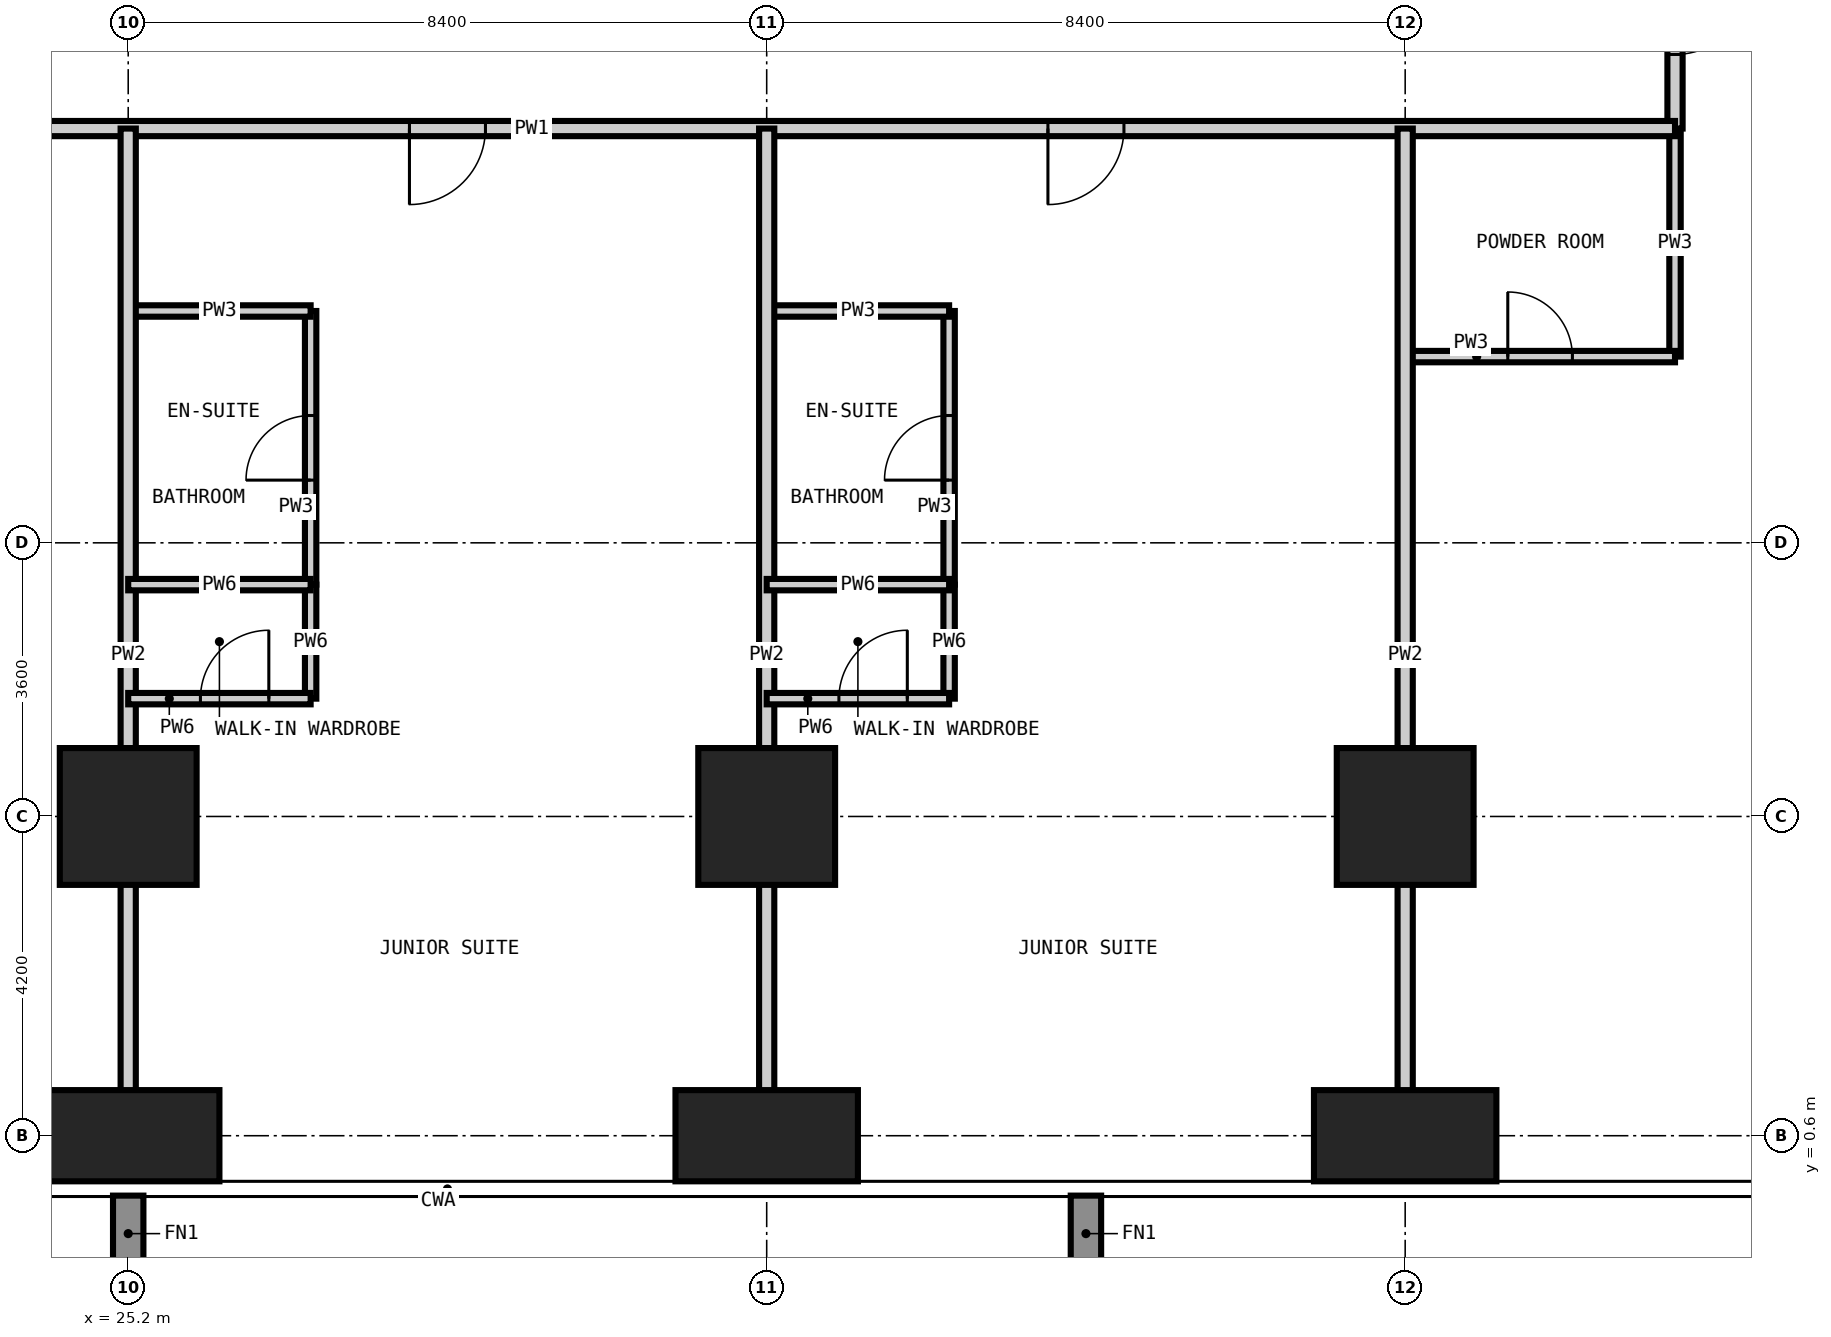
"""IFC4 building model, lengths in metres.
Left out: names, types, materials, properties, quantities, classifications, styles, units other than length and angle.
Written with IfcOpenShell. Run it as: python <this file> out.ifc"""

import sys

from ifc_helpers import new_model, si_unit, direction, frame, frame_2d, origin, origin_2d, place, context, subcontext, project, spatial, rectangle, extrude, element, fill, save


model = new_model("IFC4")
c1 = context("Model", 3, precision=1e-05, world=origin(), true_north=direction((0.0, 1.0)))
c2 = subcontext(c1, "Body", "Model", "MODEL_VIEW")
j1 = project(units=[si_unit("LENGTHUNIT", "METRE"), si_unit("PLANEANGLEUNIT", "RADIAN")], contexts=[c1])
p1 = place(None, origin())
s1 = spatial("IfcSite", under=j1, at=p1, CompositionType="ELEMENT")
p2 = place(p1, origin())
s2 = spatial("IfcBuilding", under=s1, at=p2, CompositionType="ELEMENT")
p3 = place(p2, frame((0.0, 0.0, 55.8)))
s3 = spatial("IfcBuildingStorey", under=s2, at=p3, CompositionType="ELEMENT", Elevation=55.8)
p4 = place(p3, frame((25.2, 0.6, -0.35), z_axis=(0.0, 0.0, 1.0), x_axis=(1.0, 0.0, 0.0)))
e1 = element("IfcColumn", 1, at=p4, inside=s3, PredefinedType="COLUMN", context=c2, shape_type="SweptSolid", body=[
    extrude(rectangle(XDim=2.4, YDim=1.2, at=origin_2d()), origin(), (0.0, 0.0, 1.0), 3.6),
])
p5 = place(p3, frame((25.2, 4.8, -0.35), z_axis=(0.0, 0.0, 1.0), x_axis=(1.0, 0.0, 0.0)))
e2 = element("IfcColumn", 2, at=p5, inside=s3, PredefinedType="COLUMN", context=c2, shape_type="SweptSolid", body=[
    extrude(rectangle(XDim=1.8, YDim=1.8, at=origin_2d()), origin(), (0.0, 0.0, 1.0), 3.6),
])
p6 = place(p3, frame((33.6, 0.6, -0.35), z_axis=(0.0, 0.0, 1.0), x_axis=(1.0, 0.0, 0.0)))
e3 = element("IfcColumn", 3, at=p6, inside=s3, PredefinedType="COLUMN", context=c2, shape_type="SweptSolid", body=[
    extrude(rectangle(XDim=2.4, YDim=1.2, at=origin_2d()), origin(), (0.0, 0.0, 1.0), 3.6),
])
p7 = place(p3, frame((33.6, 4.8, -0.35), z_axis=(0.0, 0.0, 1.0), x_axis=(1.0, 0.0, 0.0)))
e4 = element("IfcColumn", 4, at=p7, inside=s3, PredefinedType="COLUMN", context=c2, shape_type="SweptSolid", body=[
    extrude(rectangle(XDim=1.8, YDim=1.8, at=origin_2d()), origin(), (0.0, 0.0, 1.0), 3.6),
])
p8 = place(p3, frame((42.0, 0.6, -0.35), z_axis=(0.0, 0.0, 1.0), x_axis=(1.0, 0.0, 0.0)))
e5 = element("IfcColumn", 5, at=p8, inside=s3, PredefinedType="COLUMN", context=c2, shape_type="SweptSolid", body=[
    extrude(rectangle(XDim=2.4, YDim=1.2, at=origin_2d()), origin(), (0.0, 0.0, 1.0), 3.6),
])
p9 = place(p3, frame((42.0, 4.8, -0.35), z_axis=(0.0, 0.0, 1.0), x_axis=(1.0, 0.0, 0.0)))
e6 = element("IfcColumn", 6, at=p9, inside=s3, PredefinedType="COLUMN", context=c2, shape_type="SweptSolid", body=[
    extrude(rectangle(XDim=1.8, YDim=1.8, at=origin_2d()), origin(), (0.0, 0.0, 1.0), 3.6),
])
p10 = place(p3, frame((27.6, 7.85, 0.0), z_axis=(0.0, 0.0, 1.0), x_axis=(0.0, 1.0, 0.0)))
e7 = element("IfcWall", 7, at=p10, inside=s3, PredefinedType="PARTITIONING", context=c2, shape_type="SweptSolid", body=[
    extrude(rectangle(XDim=3.6, YDim=0.15, at=frame_2d((1.8, 0.0))), origin(), (0.0, 0.0, 1.0), 3.25),
])
p11 = place(p10, frame((1.375, 0.0, 0.0)))
e8 = element("IfcOpeningElement", 8, at=p11, cuts=e7, PredefinedType="OPENING", context=c2, shape_type="SweptSolid", body=[
    extrude(rectangle(XDim=0.85, YDim=2.1, at=frame_2d((0.425, 1.05))), frame((0.0, 0.085, 0.0), z_axis=(0.0, -1.0, 0.0), x_axis=(1.0, 0.0, 0.0)), (0.0, 0.0, 1.0), 0.17),
])
p12 = place(p3, frame((36.0, 7.85, 0.0), z_axis=(0.0, 0.0, 1.0), x_axis=(0.0, 1.0, 0.0)))
e9 = element("IfcWall", 9, at=p12, inside=s3, PredefinedType="PARTITIONING", context=c2, shape_type="SweptSolid", body=[
    extrude(rectangle(XDim=3.6, YDim=0.15, at=frame_2d((1.8, 0.0))), origin(), (0.0, 0.0, 1.0), 3.25),
])
p13 = place(p12, frame((1.375, 0.0, 0.0)))
e10 = element("IfcOpeningElement", 10, at=p13, cuts=e9, PredefinedType="OPENING", context=c2, shape_type="SweptSolid", body=[
    extrude(rectangle(XDim=0.85, YDim=2.1, at=frame_2d((0.425, 1.05))), frame((0.0, 0.085, 0.0), z_axis=(0.0, -1.0, 0.0), x_axis=(1.0, 0.0, 0.0)), (0.0, 0.0, 1.0), 0.17),
])
p14 = place(p3, frame((45.55, 10.85, 0.0), z_axis=(0.0, 0.0, 1.0), x_axis=(0.0, 1.0, 0.0)))
e11 = element("IfcWall", 11, at=p14, inside=s3, PredefinedType="PARTITIONING", context=c2, shape_type="SweptSolid", body=[
    extrude(rectangle(XDim=3.0, YDim=0.15, at=frame_2d((1.5, 0.0))), origin(), (0.0, 0.0, 1.0), 3.25),
])
p15 = place(p3, frame((42.0, 10.85, 0.0), z_axis=(0.0, 0.0, 1.0), x_axis=(1.0, 0.0, 0.0)))
e12 = element("IfcWall", 12, at=p15, inside=s3, PredefinedType="PARTITIONING", context=c2, shape_type="SweptSolid", body=[
    extrude(rectangle(XDim=3.55, YDim=0.15, at=frame_2d((1.775, 0.0))), origin(), (0.0, 0.0, 1.0), 3.25),
])
p16 = place(p15, frame((1.35, 0.0, 0.0)))
e13 = element("IfcOpeningElement", 13, at=p16, cuts=e12, PredefinedType="OPENING", context=c2, shape_type="SweptSolid", body=[
    extrude(rectangle(XDim=0.85, YDim=2.1, at=frame_2d((0.425, 1.05))), frame((0.0, 0.085, 0.0), z_axis=(0.0, -1.0, 0.0), x_axis=(1.0, 0.0, 0.0)), (0.0, 0.0, 1.0), 0.17),
])
p17 = place(p3, frame((25.2, 11.45, 0.0), z_axis=(0.0, 0.0, 1.0), x_axis=(1.0, 0.0, 0.0)))
e14 = element("IfcWall", 14, at=p17, inside=s3, PredefinedType="PARTITIONING", context=c2, shape_type="SweptSolid", body=[
    extrude(rectangle(XDim=2.4, YDim=0.15, at=frame_2d((1.2, 0.0))), origin(), (0.0, 0.0, 1.0), 3.25),
])
p18 = place(p3, frame((33.6, 11.45, 0.0), z_axis=(0.0, 0.0, 1.0), x_axis=(1.0, 0.0, 0.0)))
e15 = element("IfcWall", 15, at=p18, inside=s3, PredefinedType="PARTITIONING", context=c2, shape_type="SweptSolid", body=[
    extrude(rectangle(XDim=2.4, YDim=0.15, at=frame_2d((1.2, 0.0))), origin(), (0.0, 0.0, 1.0), 3.25),
])
p19 = place(p3, frame((45.55, 46.15, 0.0), z_axis=(0.0, 0.0, 1.0), x_axis=(0.0, -1.0, 0.0)))
e16 = element("IfcWall", 16, at=p19, inside=s3, PredefinedType="PARTITIONING", context=c2, shape_type="SweptSolid", body=[
    extrude(rectangle(XDim=32.3, YDim=0.2, at=frame_2d((16.15, 0.0))), origin(), (0.0, 0.0, 1.0), 3.25),
])
p20 = place(p19, frame((25.85, 0.0, 0.0)))
e17 = element("IfcOpeningElement", 17, at=p20, cuts=e16, PredefinedType="OPENING", context=c2, shape_type="SweptSolid", body=[
    extrude(rectangle(XDim=1.0, YDim=2.2, at=frame_2d((0.5, 1.1))), frame((0.0, 0.11, 0.0), z_axis=(0.0, -1.0, 0.0), x_axis=(1.0, 0.0, 0.0)), (0.0, 0.0, 1.0), 0.22),
])
p21 = place(p19, frame((17.45, 0.0, 0.0)))
e18 = element("IfcOpeningElement", 18, at=p21, cuts=e16, PredefinedType="OPENING", context=c2, shape_type="SweptSolid", body=[
    extrude(rectangle(XDim=1.0, YDim=2.2, at=frame_2d((0.5, 1.1))), frame((0.0, 0.11, 0.0), z_axis=(0.0, -1.0, 0.0), x_axis=(1.0, 0.0, 0.0)), (0.0, 0.0, 1.0), 0.22),
])
p22 = place(p19, frame((9.05, 0.0, 0.0)))
e19 = element("IfcOpeningElement", 19, at=p22, cuts=e16, PredefinedType="OPENING", context=c2, shape_type="SweptSolid", body=[
    extrude(rectangle(XDim=1.0, YDim=2.2, at=frame_2d((0.5, 1.1))), frame((0.0, 0.11, 0.0), z_axis=(0.0, -1.0, 0.0), x_axis=(1.0, 0.0, 0.0)), (0.0, 0.0, 1.0), 0.22),
])
p23 = place(p19, frame((30.325, 0.0, 0.0)))
e20 = element("IfcOpeningElement", 20, at=p23, cuts=e16, PredefinedType="OPENING", context=c2, shape_type="SweptSolid", body=[
    extrude(rectangle(XDim=1.0, YDim=2.2, at=frame_2d((0.5, 1.1))), frame((0.0, 0.11, 0.0), z_axis=(0.0, -1.0, 0.0), x_axis=(1.0, 0.0, 0.0)), (0.0, 0.0, 1.0), 0.22),
])
p24 = place(p19, frame((1.575, 0.0, 0.0)))
e21 = element("IfcOpeningElement", 21, at=p24, cuts=e16, PredefinedType="OPENING", context=c2, shape_type="SweptSolid", body=[
    extrude(rectangle(XDim=1.0, YDim=2.2, at=frame_2d((0.5, 1.1))), frame((0.0, 0.11, 0.0), z_axis=(0.0, -1.0, 0.0), x_axis=(1.0, 0.0, 0.0)), (0.0, 0.0, 1.0), 0.22),
])
p25 = place(p3, frame((45.55, 13.85, 0.0), z_axis=(0.0, 0.0, 1.0), x_axis=(-1.0, 0.0, 0.0)))
e22 = element("IfcWall", 22, at=p25, inside=s3, PredefinedType="PARTITIONING", context=c2, shape_type="SweptSolid", body=[
    extrude(rectangle(XDim=31.7, YDim=0.2, at=frame_2d((15.85, 0.0))), origin(), (0.0, 0.0, 1.0), 3.25),
])
p26 = place(p25, frame((24.05, 0.0, 0.0)))
e23 = element("IfcOpeningElement", 23, at=p26, cuts=e22, PredefinedType="OPENING", context=c2, shape_type="SweptSolid", body=[
    extrude(rectangle(XDim=1.0, YDim=2.2, at=frame_2d((0.5, 1.1))), frame((0.0, 0.11, 0.0), z_axis=(0.0, -1.0, 0.0), x_axis=(1.0, 0.0, 0.0)), (0.0, 0.0, 1.0), 0.22),
])
p27 = place(p25, frame((15.65, 0.0, 0.0)))
e24 = element("IfcOpeningElement", 24, at=p27, cuts=e22, PredefinedType="OPENING", context=c2, shape_type="SweptSolid", body=[
    extrude(rectangle(XDim=1.0, YDim=2.2, at=frame_2d((0.5, 1.1))), frame((0.0, 0.11, 0.0), z_axis=(0.0, -1.0, 0.0), x_axis=(1.0, 0.0, 0.0)), (0.0, 0.0, 1.0), 0.22),
])
p28 = place(p25, frame((7.25, 0.0, 0.0)))
e25 = element("IfcOpeningElement", 25, at=p28, cuts=e22, PredefinedType="OPENING", context=c2, shape_type="SweptSolid", body=[
    extrude(rectangle(XDim=1.0, YDim=2.2, at=frame_2d((0.5, 1.1))), frame((0.0, 0.11, 0.0), z_axis=(0.0, -1.0, 0.0), x_axis=(1.0, 0.0, 0.0)), (0.0, 0.0, 1.0), 0.22),
])
for number, where, z_axis, x_axis in (
    (26, (25.2, -0.008, 0.0), (0.0, 0.0, 1.0), (0.0, 1.0, 0.0)),
    (27, (33.6, -0.008, 0.0), (0.0, 0.0, 1.0), (0.0, 1.0, 0.0)),
    (28, (42.0, -0.008, 0.0), (0.0, 0.0, 1.0), (0.0, 1.0, 0.0)),
):
    element("IfcWall", number, at=place(p3, frame(where, z_axis=z_axis, x_axis=x_axis)), inside=s3, PredefinedType="PARTITIONING", context=c2, shape_type="SweptSolid", body=[
        extrude(rectangle(XDim=13.858, YDim=0.2, at=frame_2d((6.929, 0.0))), origin(), (0.0, 0.0, 1.0), 3.25),
    ])
for number, where, z_axis, x_axis in (
    (29, (27.6, 6.35, 0.0), (0.0, 0.0, 1.0), (0.0, 1.0, 0.0)),
    (30, (36.0, 6.35, 0.0), (0.0, 0.0, 1.0), (0.0, 1.0, 0.0)),
):
    element("IfcWall", number, at=place(p3, frame(where, z_axis=z_axis, x_axis=x_axis)), inside=s3, PredefinedType="PARTITIONING", context=c2, shape_type="SweptSolid", body=[
        extrude(rectangle(XDim=1.5, YDim=0.15, at=frame_2d((0.75, 0.0))), origin(), (0.0, 0.0, 1.0), 3.25),
    ])
p29 = place(p3, frame((25.2, 6.35, 0.0), z_axis=(0.0, 0.0, 1.0), x_axis=(1.0, 0.0, 0.0)))
e31 = element("IfcWall", 31, at=p29, inside=s3, PredefinedType="PARTITIONING", context=c2, shape_type="SweptSolid", body=[
    extrude(rectangle(XDim=2.4, YDim=0.15, at=frame_2d((1.2, 0.0))), origin(), (0.0, 0.0, 1.0), 3.25),
])
p30 = place(p29, frame((0.95, 0.0, 0.0)))
e32 = element("IfcOpeningElement", 32, at=p30, cuts=e31, PredefinedType="OPENING", context=c2, shape_type="SweptSolid", body=[
    extrude(rectangle(XDim=0.9, YDim=2.1, at=frame_2d((0.45, 1.05))), frame((0.0, 0.085, 0.0), z_axis=(0.0, -1.0, 0.0), x_axis=(1.0, 0.0, 0.0)), (0.0, 0.0, 1.0), 0.17),
])
p31 = place(p3, frame((33.6, 6.35, 0.0), z_axis=(0.0, 0.0, 1.0), x_axis=(1.0, 0.0, 0.0)))
e33 = element("IfcWall", 33, at=p31, inside=s3, PredefinedType="PARTITIONING", context=c2, shape_type="SweptSolid", body=[
    extrude(rectangle(XDim=2.4, YDim=0.15, at=frame_2d((1.2, 0.0))), origin(), (0.0, 0.0, 1.0), 3.25),
])
p32 = place(p31, frame((0.95, 0.0, 0.0)))
e34 = element("IfcOpeningElement", 34, at=p32, cuts=e33, PredefinedType="OPENING", context=c2, shape_type="SweptSolid", body=[
    extrude(rectangle(XDim=0.9, YDim=2.1, at=frame_2d((0.45, 1.05))), frame((0.0, 0.085, 0.0), z_axis=(0.0, -1.0, 0.0), x_axis=(1.0, 0.0, 0.0)), (0.0, 0.0, 1.0), 0.17),
])
p33 = place(p3, frame((25.2, 7.85, 0.0), z_axis=(0.0, 0.0, 1.0), x_axis=(1.0, 0.0, 0.0)))
e35 = element("IfcWall", 35, at=p33, inside=s3, PredefinedType="PARTITIONING", context=c2, shape_type="SweptSolid", body=[
    extrude(rectangle(XDim=2.4, YDim=0.15, at=frame_2d((1.2, 0.0))), origin(), (0.0, 0.0, 1.0), 3.25),
])
p34 = place(p3, frame((33.6, 7.85, 0.0), z_axis=(0.0, 0.0, 1.0), x_axis=(1.0, 0.0, 0.0)))
e36 = element("IfcWall", 36, at=p34, inside=s3, PredefinedType="PARTITIONING", context=c2, shape_type="SweptSolid", body=[
    extrude(rectangle(XDim=2.4, YDim=0.15, at=frame_2d((1.2, 0.0))), origin(), (0.0, 0.0, 1.0), 3.25),
])
p35 = place(p27, origin())
e37 = element("IfcDoor", 37, at=p35, inside=s3, OperationType="SINGLE_SWING_RIGHT", PredefinedType="DOOR", context=c2, shape_type="SweptSolid", body=[
    extrude(rectangle(XDim=1.0, YDim=2.2, at=frame_2d((0.5, 1.1))), frame((0.0, 0.025, 0.0), z_axis=(0.0, -1.0, 0.0), x_axis=(1.0, 0.0, 0.0)), (0.0, 0.0, 1.0), 0.05),
])
fill(e24, e37)
p36 = place(p11, origin())
e38 = element("IfcDoor", 38, at=p36, inside=s3, OperationType="SINGLE_SWING_LEFT", PredefinedType="DOOR", context=c2, shape_type="SweptSolid", body=[
    extrude(rectangle(XDim=0.85, YDim=2.1, at=frame_2d((0.425, 1.05))), frame((0.0, 0.025, 0.0), z_axis=(0.0, -1.0, 0.0), x_axis=(1.0, 0.0, 0.0)), (0.0, 0.0, 1.0), 0.05),
])
fill(e8, e38)
p37 = place(p30, origin())
e39 = element("IfcDoor", 39, at=p37, inside=s3, OperationType="SINGLE_SWING_RIGHT", PredefinedType="DOOR", context=c2, shape_type="SweptSolid", body=[
    extrude(rectangle(XDim=0.9, YDim=2.1, at=frame_2d((0.45, 1.05))), frame((0.0, 0.025, 0.0), z_axis=(0.0, -1.0, 0.0), x_axis=(1.0, 0.0, 0.0)), (0.0, 0.0, 1.0), 0.05),
])
fill(e32, e39)
p38 = place(p28, origin())
e40 = element("IfcDoor", 40, at=p38, inside=s3, OperationType="SINGLE_SWING_RIGHT", PredefinedType="DOOR", context=c2, shape_type="SweptSolid", body=[
    extrude(rectangle(XDim=1.0, YDim=2.2, at=frame_2d((0.5, 1.1))), frame((0.0, 0.025, 0.0), z_axis=(0.0, -1.0, 0.0), x_axis=(1.0, 0.0, 0.0)), (0.0, 0.0, 1.0), 0.05),
])
fill(e25, e40)
p39 = place(p13, origin())
e41 = element("IfcDoor", 41, at=p39, inside=s3, OperationType="SINGLE_SWING_LEFT", PredefinedType="DOOR", context=c2, shape_type="SweptSolid", body=[
    extrude(rectangle(XDim=0.85, YDim=2.1, at=frame_2d((0.425, 1.05))), frame((0.0, 0.025, 0.0), z_axis=(0.0, -1.0, 0.0), x_axis=(1.0, 0.0, 0.0)), (0.0, 0.0, 1.0), 0.05),
])
fill(e10, e41)
p40 = place(p32, origin())
e42 = element("IfcDoor", 42, at=p40, inside=s3, OperationType="SINGLE_SWING_RIGHT", PredefinedType="DOOR", context=c2, shape_type="SweptSolid", body=[
    extrude(rectangle(XDim=0.9, YDim=2.1, at=frame_2d((0.45, 1.05))), frame((0.0, 0.025, 0.0), z_axis=(0.0, -1.0, 0.0), x_axis=(1.0, 0.0, 0.0)), (0.0, 0.0, 1.0), 0.05),
])
fill(e34, e42)
p41 = place(p23, origin())
e43 = element("IfcDoor", 43, at=p41, inside=s3, OperationType="SINGLE_SWING_LEFT", PredefinedType="DOOR", context=c2, shape_type="SweptSolid", body=[
    extrude(rectangle(XDim=1.0, YDim=2.2, at=frame_2d((0.5, 1.1))), frame((0.0, 0.025, 0.0), z_axis=(0.0, -1.0, 0.0), x_axis=(1.0, 0.0, 0.0)), (0.0, 0.0, 1.0), 0.05),
])
fill(e20, e43)
p42 = place(p16, origin())
e44 = element("IfcDoor", 44, at=p42, inside=s3, OperationType="SINGLE_SWING_LEFT", PredefinedType="DOOR", context=c2, shape_type="SweptSolid", body=[
    extrude(rectangle(XDim=0.85, YDim=2.1, at=frame_2d((0.425, 1.05))), frame((0.0, 0.025, 0.0), z_axis=(0.0, -1.0, 0.0), x_axis=(1.0, 0.0, 0.0)), (0.0, 0.0, 1.0), 0.05),
])
fill(e13, e44)
save(model, sys.argv[1])
